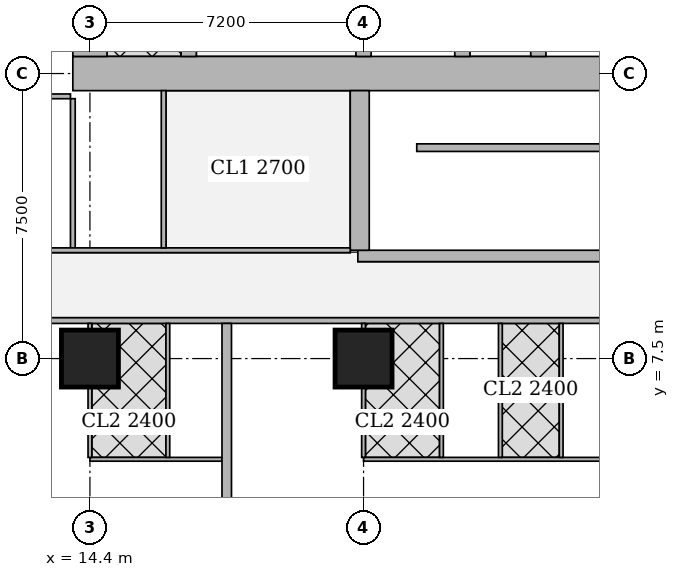
"""IFC4 building model, lengths in metres.
Left out: names, types, materials, properties, quantities, classifications, styles, units other than length and angle.
Written with IfcOpenShell. Run it as: python <this file> out.ifc"""

import sys

from ifc_helpers import new_model, si_unit, direction, frame, frame_2d, origin, origin_2d, place, context, subcontext, project, spatial, rectangle, extrude, element, fill, save


model = new_model("IFC4")
c1 = context("Model", 3, precision=1e-05, world=origin(), true_north=direction((0.0, 1.0)))
c2 = subcontext(c1, "Body", "Model", "MODEL_VIEW")
j1 = project(units=[si_unit("LENGTHUNIT", "METRE"), si_unit("PLANEANGLEUNIT", "RADIAN")], contexts=[c1])
p1 = place(None, origin())
s1 = spatial("IfcSite", under=j1, at=p1, CompositionType="ELEMENT")
p2 = place(p1, origin())
s2 = spatial("IfcBuilding", under=s1, at=p2, CompositionType="ELEMENT")
p3 = place(p2, frame((0.0, 0.0, 139.55)))
s3 = spatial("IfcBuildingStorey", under=s2, at=p3, CompositionType="ELEMENT", Elevation=139.55)
for number, where, z_axis, x_axis in (
    (1, (14.4, 7.5, 0.0), (0.0, 0.0, 1.0), (1.0, 0.0, 0.0)),
    (2, (21.6, 7.5, 0.0), (0.0, 0.0, 1.0), (1.0, 0.0, 0.0)),
):
    element("IfcColumn", number, at=place(p3, frame(where, z_axis=z_axis, x_axis=x_axis)), inside=s3, PredefinedType="COLUMN", context=c2, shape_type="SweptSolid", body=[
        extrude(rectangle(XDim=1.5, YDim=1.5, at=origin_2d()), origin(), (0.0, 0.0, 1.0), 3.75),
    ])
p4 = place(p3, frame((13.95, 15.0, 0.0), z_axis=(0.0, 0.0, 1.0), x_axis=(1.0, 0.0, 0.0)))
e3 = element("IfcWall", 3, at=p4, inside=s3, PredefinedType="SHEAR", context=c2, shape_type="SweptSolid", body=[
    extrude(rectangle(XDim=15.3, YDim=0.9, at=frame_2d((7.65, 0.0))), origin(), (0.0, 0.0, 1.0), 3.75),
])
p5 = place(p4, frame((4.45, 0.0, 0.0)))
e4 = element("IfcOpeningElement", 4, at=p5, cuts=e3, PredefinedType="OPENING", context=c2, shape_type="SweptSolid", body=[
    extrude(rectangle(XDim=1.8, YDim=2.1, at=frame_2d((0.9, 1.05))), frame((0.0, 0.46, 0.0), z_axis=(0.0, -1.0, 0.0), x_axis=(1.0, 0.0, 0.0)), (0.0, 0.0, 1.0), 0.92),
])
p6 = place(p4, frame((10.7, 0.0, 0.0)))
e5 = element("IfcOpeningElement", 5, at=p6, cuts=e3, PredefinedType="OPENING", context=c2, shape_type="SweptSolid", body=[
    extrude(rectangle(XDim=1.1, YDim=2.1, at=frame_2d((0.55, 1.05))), frame((0.0, 0.46, 0.0), z_axis=(0.0, -1.0, 0.0), x_axis=(1.0, 0.0, 0.0)), (0.0, 0.0, 1.0), 0.92),
])
p7 = place(p3, frame((14.4, 15.45, 0.0), z_axis=(0.0, 0.0, 1.0), x_axis=(0.0, 1.0, 0.0)))
e6 = element("IfcWall", 6, at=p7, inside=s3, PredefinedType="SHEAR", context=c2, shape_type="SweptSolid", body=[
    extrude(rectangle(XDim=14.1, YDim=0.9, at=frame_2d((7.05, 0.0))), origin(), (0.0, 0.0, 1.0), 3.75),
])
p8 = place(p3, frame((17.0, 15.45, 0.0), z_axis=(0.0, 0.0, 1.0), x_axis=(0.0, 1.0, 0.0)))
e7 = element("IfcWall", 7, at=p8, inside=s3, PredefinedType="SHEAR", context=c2, shape_type="SweptSolid", body=[
    extrude(rectangle(XDim=14.1, YDim=0.4, at=frame_2d((7.05, 0.0))), origin(), (0.0, 0.0, 1.0), 3.75),
])
p9 = place(p8, frame((0.925, 0.0, 0.0)))
e8 = element("IfcOpeningElement", 8, at=p9, cuts=e7, PredefinedType="OPENING", context=c2, shape_type="SweptSolid", body=[
    extrude(rectangle(XDim=1.0, YDim=2.1, at=frame_2d((0.5, 1.05))), frame((0.0, 0.21, 0.0), z_axis=(0.0, -1.0, 0.0), x_axis=(1.0, 0.0, 0.0)), (0.0, 0.0, 1.0), 0.42),
])
p10 = place(p8, frame((4.675, 0.0, 0.0)))
e9 = element("IfcOpeningElement", 9, at=p10, cuts=e7, PredefinedType="OPENING", context=c2, shape_type="SweptSolid", body=[
    extrude(rectangle(XDim=1.0, YDim=2.1, at=frame_2d((0.5, 1.05))), frame((0.0, 0.21, 0.0), z_axis=(0.0, -1.0, 0.0), x_axis=(1.0, 0.0, 0.0)), (0.0, 0.0, 1.0), 0.42),
])
p11 = place(p8, frame((8.425, 0.0, 0.0)))
e10 = element("IfcOpeningElement", 10, at=p11, cuts=e7, PredefinedType="OPENING", context=c2, shape_type="SweptSolid", body=[
    extrude(rectangle(XDim=1.0, YDim=2.1, at=frame_2d((0.5, 1.05))), frame((0.0, 0.21, 0.0), z_axis=(0.0, -1.0, 0.0), x_axis=(1.0, 0.0, 0.0)), (0.0, 0.0, 1.0), 0.42),
])
p12 = place(p8, frame((12.175, 0.0, 0.0)))
e11 = element("IfcOpeningElement", 11, at=p12, cuts=e7, PredefinedType="OPENING", context=c2, shape_type="SweptSolid", body=[
    extrude(rectangle(XDim=1.0, YDim=2.1, at=frame_2d((0.5, 1.05))), frame((0.0, 0.21, 0.0), z_axis=(0.0, -1.0, 0.0), x_axis=(1.0, 0.0, 0.0)), (0.0, 0.0, 1.0), 0.42),
])
p13 = place(p3, frame((21.6, 15.45, 0.0), z_axis=(0.0, 0.0, 1.0), x_axis=(0.0, 1.0, 0.0)))
e12 = element("IfcWall", 12, at=p13, inside=s3, PredefinedType="SHEAR", context=c2, shape_type="SweptSolid", body=[
    extrude(rectangle(XDim=14.1, YDim=0.4, at=frame_2d((7.05, 0.0))), origin(), (0.0, 0.0, 1.0), 3.75),
])
p14 = place(p13, frame((0.875, 0.0, 0.0)))
e13 = element("IfcOpeningElement", 13, at=p14, cuts=e12, PredefinedType="OPENING", context=c2, shape_type="SweptSolid", body=[
    extrude(rectangle(XDim=1.1, YDim=2.1, at=frame_2d((0.55, 1.05))), frame((0.0, 0.21, 0.0), z_axis=(0.0, -1.0, 0.0), x_axis=(1.0, 0.0, 0.0)), (0.0, 0.0, 1.0), 0.42),
])
p15 = place(p13, frame((4.625, 0.0, 0.0)))
e14 = element("IfcOpeningElement", 14, at=p15, cuts=e12, PredefinedType="OPENING", context=c2, shape_type="SweptSolid", body=[
    extrude(rectangle(XDim=1.1, YDim=2.1, at=frame_2d((0.55, 1.05))), frame((0.0, 0.21, 0.0), z_axis=(0.0, -1.0, 0.0), x_axis=(1.0, 0.0, 0.0)), (0.0, 0.0, 1.0), 0.42),
])
p16 = place(p13, frame((8.375, 0.0, 0.0)))
e15 = element("IfcOpeningElement", 15, at=p16, cuts=e12, PredefinedType="OPENING", context=c2, shape_type="SweptSolid", body=[
    extrude(rectangle(XDim=1.1, YDim=2.1, at=frame_2d((0.55, 1.05))), frame((0.0, 0.21, 0.0), z_axis=(0.0, -1.0, 0.0), x_axis=(1.0, 0.0, 0.0)), (0.0, 0.0, 1.0), 0.42),
])
p17 = place(p13, frame((12.125, 0.0, 0.0)))
e16 = element("IfcOpeningElement", 16, at=p17, cuts=e12, PredefinedType="OPENING", context=c2, shape_type="SweptSolid", body=[
    extrude(rectangle(XDim=1.1, YDim=2.1, at=frame_2d((0.55, 1.05))), frame((0.0, 0.21, 0.0), z_axis=(0.0, -1.0, 0.0), x_axis=(1.0, 0.0, 0.0)), (0.0, 0.0, 1.0), 0.42),
])
p18 = place(p3, frame((24.2, 15.45, 0.0), z_axis=(0.0, 0.0, 1.0), x_axis=(0.0, 1.0, 0.0)))
e17 = element("IfcWall", 17, at=p18, inside=s3, PredefinedType="SHEAR", context=c2, shape_type="SweptSolid", body=[
    extrude(rectangle(XDim=14.1, YDim=0.4, at=frame_2d((7.05, 0.0))), origin(), (0.0, 0.0, 1.0), 3.75),
])
p19 = place(p3, frame((26.2, 15.45, 0.0), z_axis=(0.0, 0.0, 1.0), x_axis=(0.0, 1.0, 0.0)))
e18 = element("IfcWall", 18, at=p19, inside=s3, PredefinedType="SHEAR", context=c2, shape_type="SweptSolid", body=[
    extrude(rectangle(XDim=3.1, YDim=0.4, at=frame_2d((1.55, 0.0))), origin(), (0.0, 0.0, 1.0), 3.75),
])
p20 = place(p19, frame((0.825, 0.0, 0.0)))
e19 = element("IfcOpeningElement", 19, at=p20, cuts=e18, PredefinedType="OPENING", context=c2, shape_type="SweptSolid", body=[
    extrude(rectangle(XDim=1.2, YDim=2.1, at=frame_2d((0.6, 1.05))), frame((0.0, 0.21, 0.0), z_axis=(0.0, -1.0, 0.0), x_axis=(1.0, 0.0, 0.0)), (0.0, 0.0, 1.0), 0.42),
])
p21 = place(p3, frame((21.45, 10.2, 0.0), z_axis=(0.0, 0.0, 1.0), x_axis=(1.0, 0.0, 0.0)))
e20 = element("IfcWall", 20, at=p21, inside=s3, PredefinedType="SHEAR", context=c2, shape_type="SweptSolid", body=[
    extrude(rectangle(XDim=7.5, YDim=0.3, at=frame_2d((3.75, 0.0))), origin(), (0.0, 0.0, 1.0), 3.75),
])
p22 = place(p21, frame((0.5, 0.0, 0.0)))
e21 = element("IfcOpeningElement", 21, at=p22, cuts=e20, PredefinedType="OPENING", context=c2, shape_type="SweptSolid", body=[
    extrude(rectangle(XDim=1.1, YDim=2.1, at=frame_2d((0.55, 1.05))), frame((0.0, 0.16, 0.0), z_axis=(0.0, -1.0, 0.0), x_axis=(1.0, 0.0, 0.0)), (0.0, 0.0, 1.0), 0.32),
])
p23 = place(p3, frame((21.5, 10.35, 0.0), z_axis=(0.0, 0.0, 1.0), x_axis=(0.0, 1.0, 0.0)))
e22 = element("IfcWall", 22, at=p23, inside=s3, PredefinedType="SHEAR", context=c2, shape_type="SweptSolid", body=[
    extrude(rectangle(XDim=4.2, YDim=0.5, at=frame_2d((2.1, 0.0))), origin(), (0.0, 0.0, 1.0), 3.75),
])
p24 = place(p3, frame((40.053, 8.5, 0.0), z_axis=(0.0, 0.0, 1.0), x_axis=(-1.0, 0.0, 0.0)))
e23 = element("IfcWall", 23, at=p24, inside=s3, PredefinedType="SOLIDWALL", context=c2, shape_type="SweptSolid", body=[
    extrude(rectangle(XDim=31.703, YDim=0.15, at=frame_2d((15.852, 0.0))), origin(), (0.0, 0.0, 1.0), 3.5),
])
p25 = place(p24, frame((28.103, 0.0, 0.0)))
e24 = element("IfcOpeningElement", 24, at=p25, cuts=e23, PredefinedType="OPENING", context=c2, shape_type="SweptSolid", body=[
    extrude(rectangle(XDim=1.0, YDim=2.1, at=frame_2d((0.5, 1.05))), frame((0.0, 0.085, 0.0), z_axis=(0.0, -1.0, 0.0), x_axis=(1.0, 0.0, 0.0)), (0.0, 0.0, 1.0), 0.17),
])
p26 = place(p24, frame((19.853, 0.0, 0.0)))
e25 = element("IfcOpeningElement", 25, at=p26, cuts=e23, PredefinedType="OPENING", context=c2, shape_type="SweptSolid", body=[
    extrude(rectangle(XDim=1.0, YDim=2.1, at=frame_2d((0.5, 1.05))), frame((0.0, 0.085, 0.0), z_axis=(0.0, -1.0, 0.0), x_axis=(1.0, 0.0, 0.0)), (0.0, 0.0, 1.0), 0.17),
])
p27 = place(p24, frame((5.514, 0.0, 0.0)))
e26 = element("IfcOpeningElement", 26, at=p27, cuts=e23, PredefinedType="OPENING", context=c2, shape_type="SweptSolid", body=[
    extrude(rectangle(XDim=1.0, YDim=2.1, at=frame_2d((0.5, 1.05))), frame((0.0, 0.085, 0.0), z_axis=(0.0, -1.0, 0.0), x_axis=(1.0, 0.0, 0.0)), (0.0, 0.0, 1.0), 0.17),
])
p28 = place(p3, frame((17.875, 4.85, 0.0), z_axis=(0.0, 0.0, 1.0), x_axis=(-1.0, 0.0, 0.0)))
e27 = element("IfcWall", 27, at=p28, inside=s3, PredefinedType="PARTITIONING", context=c2, shape_type="SweptSolid", body=[
    extrude(rectangle(XDim=3.475, YDim=0.1, at=frame_2d((1.738, 0.0))), origin(), (0.0, 0.0, 1.0), 3.5),
])
p29 = place(p28, frame((2.0, 0.0, 0.0)))
e28 = element("IfcOpeningElement", 28, at=p29, cuts=e27, PredefinedType="OPENING", context=c2, shape_type="SweptSolid", body=[
    extrude(rectangle(XDim=0.9, YDim=2.1, at=frame_2d((0.45, 1.05))), frame((0.0, 0.06, 0.0), z_axis=(0.0, -1.0, 0.0), x_axis=(1.0, 0.0, 0.0)), (0.0, 0.0, 1.0), 0.12),
])
p30 = place(p28, frame((0.2, 0.0, 0.0)))
e29 = element("IfcOpeningElement", 29, at=p30, cuts=e27, PredefinedType="OPENING", context=c2, shape_type="SweptSolid", body=[
    extrude(rectangle(XDim=0.9, YDim=2.1, at=frame_2d((0.45, 1.05))), frame((0.0, 0.06, 0.0), z_axis=(0.0, -1.0, 0.0), x_axis=(1.0, 0.0, 0.0)), (0.0, 0.0, 1.0), 0.12),
])
p31 = place(p3, frame((14.4, 4.9, 0.0), z_axis=(0.0, 0.0, 1.0), x_axis=(0.0, 1.0, 0.0)))
e30 = element("IfcWall", 30, at=p31, inside=s3, PredefinedType="PARTITIONING", context=c2, shape_type="SweptSolid", body=[
    extrude(rectangle(XDim=1.849, YDim=0.1, at=frame_2d((0.925, 0.0))), origin(), (0.0, 0.0, 1.0), 3.5),
])
p32 = place(p3, frame((14.4, 8.251, 0.0), z_axis=(0.0, 0.0, 1.0), x_axis=(0.0, 1.0, 0.0)))
e31 = element("IfcWall", 31, at=p32, inside=s3, PredefinedType="PARTITIONING", context=c2, shape_type="SweptSolid", body=[
    extrude(rectangle(XDim=0.174, YDim=0.1, at=frame_2d((0.087, 0.0))), origin(), (0.0, 0.0, 1.0), 3.5),
])
p33 = place(p3, frame((16.45, 4.9, 0.0), z_axis=(0.0, 0.0, 1.0), x_axis=(0.0, 1.0, 0.0)))
e32 = element("IfcWall", 32, at=p33, inside=s3, PredefinedType="PARTITIONING", context=c2, shape_type="SweptSolid", body=[
    extrude(rectangle(XDim=3.525, YDim=0.1, at=frame_2d((1.763, 0.0))), origin(), (0.0, 0.0, 1.0), 3.5),
])
p34 = place(p3, frame((32.275, 4.85, 0.0), z_axis=(0.0, 0.0, 1.0), x_axis=(-1.0, 0.0, 0.0)))
e33 = element("IfcWall", 33, at=p34, inside=s3, PredefinedType="PARTITIONING", context=c2, shape_type="SweptSolid", body=[
    extrude(rectangle(XDim=10.675, YDim=0.1, at=frame_2d((5.337, 0.0))), origin(), (0.0, 0.0, 1.0), 3.5),
])
p35 = place(p34, frame((9.2, 0.0, 0.0)))
e34 = element("IfcOpeningElement", 34, at=p35, cuts=e33, PredefinedType="OPENING", context=c2, shape_type="SweptSolid", body=[
    extrude(rectangle(XDim=0.9, YDim=2.1, at=frame_2d((0.45, 1.05))), frame((0.0, 0.06, 0.0), z_axis=(0.0, -1.0, 0.0), x_axis=(1.0, 0.0, 0.0)), (0.0, 0.0, 1.0), 0.12),
])
p36 = place(p34, frame((5.825, 0.0, 0.0)))
e35 = element("IfcOpeningElement", 35, at=p36, cuts=e33, PredefinedType="OPENING", context=c2, shape_type="SweptSolid", body=[
    extrude(rectangle(XDim=0.9, YDim=2.1, at=frame_2d((0.45, 1.05))), frame((0.0, 0.06, 0.0), z_axis=(0.0, -1.0, 0.0), x_axis=(1.0, 0.0, 0.0)), (0.0, 0.0, 1.0), 0.12),
])
p37 = place(p34, frame((2.175, 0.0, 0.0)))
e36 = element("IfcOpeningElement", 36, at=p37, cuts=e33, PredefinedType="OPENING", context=c2, shape_type="SweptSolid", body=[
    extrude(rectangle(XDim=0.9, YDim=2.1, at=frame_2d((0.45, 1.05))), frame((0.0, 0.06, 0.0), z_axis=(0.0, -1.0, 0.0), x_axis=(1.0, 0.0, 0.0)), (0.0, 0.0, 1.0), 0.12),
])
p38 = place(p34, frame((7.4, 0.0, 0.0)))
e37 = element("IfcOpeningElement", 37, at=p38, cuts=e33, PredefinedType="OPENING", context=c2, shape_type="SweptSolid", body=[
    extrude(rectangle(XDim=0.9, YDim=2.1, at=frame_2d((0.45, 1.05))), frame((0.0, 0.06, 0.0), z_axis=(0.0, -1.0, 0.0), x_axis=(1.0, 0.0, 0.0)), (0.0, 0.0, 1.0), 0.12),
])
p39 = place(p34, frame((4.025, 0.0, 0.0)))
e38 = element("IfcOpeningElement", 38, at=p39, cuts=e33, PredefinedType="OPENING", context=c2, shape_type="SweptSolid", body=[
    extrude(rectangle(XDim=0.9, YDim=2.1, at=frame_2d((0.45, 1.05))), frame((0.0, 0.06, 0.0), z_axis=(0.0, -1.0, 0.0), x_axis=(1.0, 0.0, 0.0)), (0.0, 0.0, 1.0), 0.12),
])
p40 = place(p34, frame((0.375, 0.0, 0.0)))
e39 = element("IfcOpeningElement", 39, at=p40, cuts=e33, PredefinedType="OPENING", context=c2, shape_type="SweptSolid", body=[
    extrude(rectangle(XDim=0.9, YDim=2.1, at=frame_2d((0.45, 1.05))), frame((0.0, 0.06, 0.0), z_axis=(0.0, -1.0, 0.0), x_axis=(1.0, 0.0, 0.0)), (0.0, 0.0, 1.0), 0.12),
])
p41 = place(p3, frame((21.6, 4.9, 0.0), z_axis=(0.0, 0.0, 1.0), x_axis=(0.0, 1.0, 0.0)))
e40 = element("IfcWall", 40, at=p41, inside=s3, PredefinedType="PARTITIONING", context=c2, shape_type="SweptSolid", body=[
    extrude(rectangle(XDim=1.849, YDim=0.1, at=frame_2d((0.925, 0.0))), origin(), (0.0, 0.0, 1.0), 3.5),
])
p42 = place(p3, frame((21.6, 8.251, 0.0), z_axis=(0.0, 0.0, 1.0), x_axis=(0.0, 1.0, 0.0)))
e41 = element("IfcWall", 41, at=p42, inside=s3, PredefinedType="PARTITIONING", context=c2, shape_type="SweptSolid", body=[
    extrude(rectangle(XDim=0.174, YDim=0.1, at=frame_2d((0.087, 0.0))), origin(), (0.0, 0.0, 1.0), 3.5),
])
for number, where, z_axis, x_axis in (
    (42, (25.2, 4.9, 0.0), (0.0, 0.0, 1.0), (0.0, 1.0, 0.0)),
    (43, (23.65, 4.9, 0.0), (0.0, 0.0, 1.0), (0.0, 1.0, 0.0)),
    (44, (26.8, 4.9, 0.0), (0.0, 0.0, 1.0), (0.0, 1.0, 0.0)),
):
    element("IfcWall", number, at=place(p3, frame(where, z_axis=z_axis, x_axis=x_axis)), inside=s3, PredefinedType="PARTITIONING", context=c2, shape_type="SweptSolid", body=[
        extrude(rectangle(XDim=3.525, YDim=0.1, at=frame_2d((1.763, 0.0))), origin(), (0.0, 0.0, 1.0), 3.5),
    ])
p43 = place(p3, frame((18.0, 3.65, 0.0), z_axis=(0.0, 0.0, 1.0), x_axis=(0.0, 1.0, 0.0)))
e45 = element("IfcWall", 45, at=p43, inside=s3, PredefinedType="SOLIDWALL", context=c2, shape_type="SweptSolid", body=[
    extrude(rectangle(XDim=4.775, YDim=0.25, at=frame_2d((2.388, 0.0))), origin(), (0.0, 0.0, 1.0), 3.5),
])
p44 = place(p3, frame((10.413, 14.4, 0.0), z_axis=(0.0, 0.0, 1.0), x_axis=(1.0, 0.0, 0.0)))
e46 = element("IfcWall", 46, at=p44, inside=s3, PredefinedType="PARTITIONING", context=c2, shape_type="SweptSolid", body=[
    extrude(rectangle(XDim=3.475, YDim=0.125, at=frame_2d((1.737, 0.0))), origin(), (0.0, 0.0, 1.0), 3.5),
])
p45 = place(p3, frame((13.95, 10.413, 0.0), z_axis=(0.0, 0.0, 1.0), x_axis=(0.0, 1.0, 0.0)))
e47 = element("IfcWall", 47, at=p45, inside=s3, PredefinedType="PARTITIONING", context=c2, shape_type="SweptSolid", body=[
    extrude(rectangle(XDim=3.925, YDim=0.125, at=frame_2d((1.962, 0.0))), origin(), (0.0, 0.0, 1.0), 3.5),
])
p46 = place(p3, frame((10.413, 10.35, 0.0), z_axis=(0.0, 0.0, 1.0), x_axis=(1.0, 0.0, 0.0)))
e48 = element("IfcWall", 48, at=p46, inside=s3, PredefinedType="PARTITIONING", context=c2, shape_type="SweptSolid", body=[
    extrude(rectangle(XDim=10.837, YDim=0.125, at=frame_2d((5.418, 0.0))), origin(), (0.0, 0.0, 1.0), 3.5),
])
p47 = place(p46, frame((7.582, 0.0, 0.0)))
e49 = element("IfcOpeningElement", 49, at=p47, cuts=e48, PredefinedType="OPENING", context=c2, shape_type="SweptSolid", body=[
    extrude(rectangle(XDim=1.8, YDim=2.1, at=frame_2d((0.9, 1.05))), frame((0.0, 0.073, 0.0), z_axis=(0.0, -1.0, 0.0), x_axis=(1.0, 0.0, 0.0)), (0.0, 0.0, 1.0), 0.145),
])
p48 = place(p3, frame((16.34, 10.413, 0.0), z_axis=(0.0, 0.0, 1.0), x_axis=(0.0, 1.0, 0.0)))
e50 = element("IfcWall", 50, at=p48, inside=s3, PredefinedType="PARTITIONING", context=c2, shape_type="SweptSolid", body=[
    extrude(rectangle(XDim=4.137, YDim=0.125, at=frame_2d((2.068, 0.0))), origin(), (0.0, 0.0, 1.0), 3.5),
])
p49 = place(p48, frame((1.512, 0.0, 0.0)))
e51 = element("IfcOpeningElement", 51, at=p49, cuts=e50, PredefinedType="OPENING", context=c2, shape_type="SweptSolid", body=[
    extrude(rectangle(XDim=1.0, YDim=2.1, at=frame_2d((0.5, 1.05))), frame((0.0, 0.073, 0.0), z_axis=(0.0, -1.0, 0.0), x_axis=(1.0, 0.0, 0.0)), (0.0, 0.0, 1.0), 0.145),
])
p50 = place(p3, frame((23.0, 13.05, 0.0), z_axis=(0.0, 0.0, 1.0), x_axis=(1.0, 0.0, 0.0)))
e52 = element("IfcWall", 52, at=p50, inside=s3, PredefinedType="SHEAR", context=c2, shape_type="SweptSolid", body=[
    extrude(rectangle(XDim=5.8, YDim=0.2, at=frame_2d((2.9, 0.0))), origin(), (0.0, 0.0, 1.0), 3.75),
])
p51 = place(p29, origin())
e53 = element("IfcDoor", 53, at=p51, inside=s3, OperationType="SINGLE_SWING_LEFT", PredefinedType="DOOR", context=c2, shape_type="SweptSolid", body=[
    extrude(rectangle(XDim=0.9, YDim=2.1, at=frame_2d((0.45, 1.05))), frame((0.0, 0.025, 0.0), z_axis=(0.0, -1.0, 0.0), x_axis=(1.0, 0.0, 0.0)), (0.0, 0.0, 1.0), 0.05),
])
fill(e28, e53)
p52 = place(p30, origin())
e54 = element("IfcDoor", 54, at=p52, inside=s3, OperationType="SINGLE_SWING_RIGHT", PredefinedType="DOOR", context=c2, shape_type="SweptSolid", body=[
    extrude(rectangle(XDim=0.9, YDim=2.1, at=frame_2d((0.45, 1.05))), frame((0.0, 0.025, 0.0), z_axis=(0.0, -1.0, 0.0), x_axis=(1.0, 0.0, 0.0)), (0.0, 0.0, 1.0), 0.05),
])
fill(e29, e54)
p53 = place(p35, origin())
e55 = element("IfcDoor", 55, at=p53, inside=s3, OperationType="SINGLE_SWING_LEFT", PredefinedType="DOOR", context=c2, shape_type="SweptSolid", body=[
    extrude(rectangle(XDim=0.9, YDim=2.1, at=frame_2d((0.45, 1.05))), frame((0.0, 0.025, 0.0), z_axis=(0.0, -1.0, 0.0), x_axis=(1.0, 0.0, 0.0)), (0.0, 0.0, 1.0), 0.05),
])
fill(e34, e55)
p54 = place(p36, origin())
e56 = element("IfcDoor", 56, at=p54, inside=s3, OperationType="SINGLE_SWING_RIGHT", PredefinedType="DOOR", context=c2, shape_type="SweptSolid", body=[
    extrude(rectangle(XDim=0.9, YDim=2.1, at=frame_2d((0.45, 1.05))), frame((0.0, 0.025, 0.0), z_axis=(0.0, -1.0, 0.0), x_axis=(1.0, 0.0, 0.0)), (0.0, 0.0, 1.0), 0.05),
])
fill(e35, e56)
p55 = place(p38, origin())
e57 = element("IfcDoor", 57, at=p55, inside=s3, OperationType="SINGLE_SWING_LEFT", PredefinedType="DOOR", context=c2, shape_type="SweptSolid", body=[
    extrude(rectangle(XDim=0.9, YDim=2.1, at=frame_2d((0.45, 1.05))), frame((0.0, 0.025, 0.0), z_axis=(0.0, -1.0, 0.0), x_axis=(1.0, 0.0, 0.0)), (0.0, 0.0, 1.0), 0.05),
])
fill(e37, e57)
p56 = place(p39, origin())
e58 = element("IfcDoor", 58, at=p56, inside=s3, OperationType="SINGLE_SWING_LEFT", PredefinedType="DOOR", context=c2, shape_type="SweptSolid", body=[
    extrude(rectangle(XDim=0.9, YDim=2.1, at=frame_2d((0.45, 1.05))), frame((0.0, 0.025, 0.0), z_axis=(0.0, -1.0, 0.0), x_axis=(1.0, 0.0, 0.0)), (0.0, 0.0, 1.0), 0.05),
])
fill(e38, e58)
p57 = place(p26, origin())
e59 = element("IfcDoor", 59, at=p57, inside=s3, OperationType="SINGLE_SWING_RIGHT", PredefinedType="DOOR", context=c2, shape_type="SweptSolid", body=[
    extrude(rectangle(XDim=1.0, YDim=2.1, at=frame_2d((0.5, 1.05))), frame((0.0, 0.025, 0.0), z_axis=(0.0, -1.0, 0.0), x_axis=(1.0, 0.0, 0.0)), (0.0, 0.0, 1.0), 0.05),
])
fill(e25, e59)
p58 = place(p49, origin())
e60 = element("IfcDoor", 60, at=p58, inside=s3, OperationType="SINGLE_SWING_LEFT", PredefinedType="DOOR", context=c2, shape_type="SweptSolid", body=[
    extrude(rectangle(XDim=1.0, YDim=2.1, at=frame_2d((0.5, 1.05))), frame((0.0, 0.025, 0.0), z_axis=(0.0, -1.0, 0.0), x_axis=(1.0, 0.0, 0.0)), (0.0, 0.0, 1.0), 0.05),
])
fill(e51, e60)
p59 = place(p47, origin())
e61 = element("IfcDoor", 61, at=p59, inside=s3, OperationType="DOUBLE_DOOR_SINGLE_SWING", PredefinedType="DOOR", context=c2, shape_type="SweptSolid", body=[
    extrude(rectangle(XDim=1.8, YDim=2.1, at=frame_2d((0.9, 1.05))), frame((0.0, 0.025, 0.0), z_axis=(0.0, -1.0, 0.0), x_axis=(1.0, 0.0, 0.0)), (0.0, 0.0, 1.0), 0.05),
])
fill(e49, e61)
p60 = place(p5, origin())
e62 = element("IfcDoor", 62, at=p60, inside=s3, OperationType="DOUBLE_DOOR_SINGLE_SWING", PredefinedType="DOOR", context=c2, shape_type="SweptSolid", body=[
    extrude(rectangle(XDim=1.8, YDim=2.1, at=frame_2d((0.9, 1.05))), frame((0.0, 0.025, 0.0), z_axis=(0.0, -1.0, 0.0), x_axis=(1.0, 0.0, 0.0)), (0.0, 0.0, 1.0), 0.05),
])
fill(e4, e62)
p61 = place(p6, origin())
e63 = element("IfcDoor", 63, at=p61, inside=s3, OperationType="SINGLE_SWING_RIGHT", PredefinedType="DOOR", context=c2, shape_type="SweptSolid", body=[
    extrude(rectangle(XDim=1.1, YDim=2.1, at=frame_2d((0.55, 1.05))), frame((0.0, 0.025, 0.0), z_axis=(0.0, -1.0, 0.0), x_axis=(1.0, 0.0, 0.0)), (0.0, 0.0, 1.0), 0.05),
])
fill(e5, e63)
p62 = place(p22, origin())
e64 = element("IfcDoor", 64, at=p62, inside=s3, OperationType="SINGLE_SWING_LEFT", PredefinedType="DOOR", context=c2, shape_type="SweptSolid", body=[
    extrude(rectangle(XDim=1.1, YDim=2.1, at=frame_2d((0.55, 1.05))), frame((0.0, 0.025, 0.0), z_axis=(0.0, -1.0, 0.0), x_axis=(1.0, 0.0, 0.0)), (0.0, 0.0, 1.0), 0.05),
])
fill(e21, e64)
save(model, sys.argv[1])
